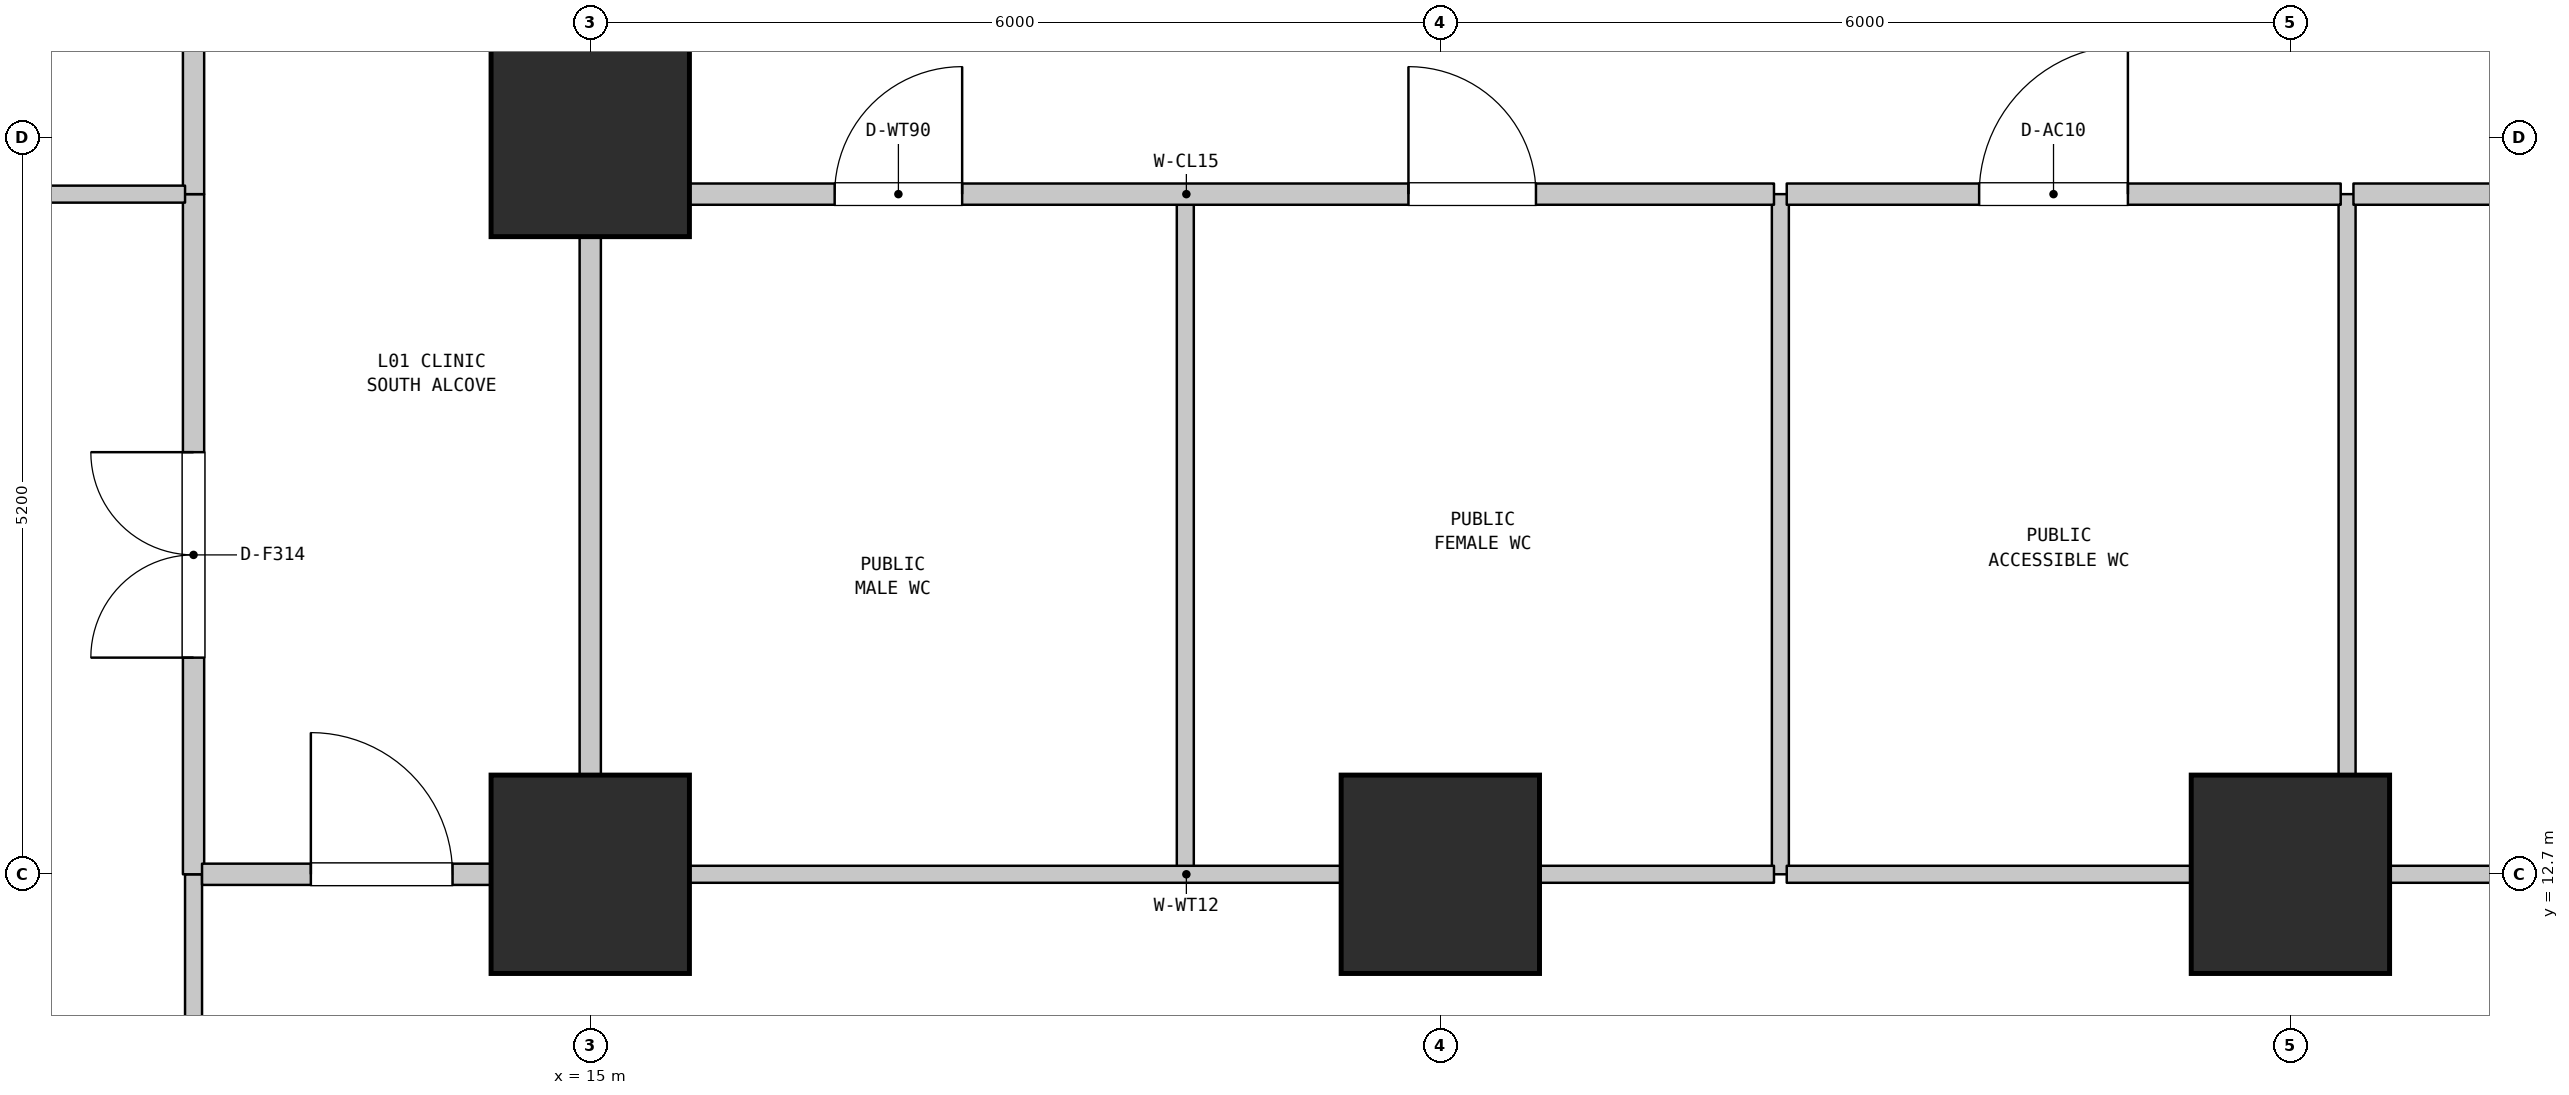
"""IFC4 building model, lengths in metres.
Left out: names, types, materials, properties, quantities, classifications, styles, units other than length and angle.
Written with IfcOpenShell. Run it as: python <this file> out.ifc"""

import sys

from ifc_helpers import new_model, si_unit, direction, frame, frame_2d, origin, origin_2d, place, context, subcontext, project, spatial, rectangle, extrude, element, fill, save


model = new_model("IFC4")
c1 = context("Model", 3, precision=1e-05, world=origin(), true_north=direction((0.0, 1.0)))
c2 = subcontext(c1, "Body", "Model", "MODEL_VIEW")
j1 = project(units=[si_unit("LENGTHUNIT", "METRE"), si_unit("PLANEANGLEUNIT", "RADIAN")], contexts=[c1])
p1 = place(None, origin())
s1 = spatial("IfcSite", under=j1, at=p1, CompositionType="ELEMENT")
p2 = place(p1, origin())
s2 = spatial("IfcBuilding", under=s1, at=p2, CompositionType="ELEMENT")
p3 = place(p2, frame((0.0, 0.0, 6.5)))
s3 = spatial("IfcBuildingStorey", under=s2, at=p3, CompositionType="ELEMENT", Elevation=6.5)
for number, where, z_axis, x_axis in (
    (1, (15.0, 12.7, 0.0), (0.0, 0.0, 1.0), (1.0, 0.0, 0.0)),
    (2, (15.0, 17.9, 0.0), (0.0, 0.0, 1.0), (1.0, 0.0, 0.0)),
    (3, (21.0, 12.7, 0.0), (0.0, 0.0, 1.0), (1.0, 0.0, 0.0)),
    (4, (27.0, 12.7, 0.0), (0.0, 0.0, 1.0), (1.0, 0.0, 0.0)),
):
    element("IfcColumn", number, at=place(p3, frame(where, z_axis=z_axis, x_axis=x_axis)), inside=s3, PredefinedType="COLUMN", context=c2, shape_type="SweptSolid", body=[
        extrude(rectangle(XDim=1.4, YDim=1.4, at=origin_2d()), origin(), (0.0, 0.0, 1.0), 6.5),
    ])
p4 = place(p3, frame((12.2, 0.71, 0.0), z_axis=(0.0, 0.0, 1.0), x_axis=(0.0, 1.0, 0.0)))
e5 = element("IfcWall", 5, at=p4, inside=s3, PredefinedType="PARTITIONING", context=c2, shape_type="SweptSolid", body=[
    extrude(rectangle(XDim=11.99, YDim=0.12, at=frame_2d((5.995, 0.0))), origin(), (0.0, 0.0, 1.0), 6.17),
])
p5 = place(p3, frame((12.2, 12.7, 0.0), z_axis=(0.0, 0.0, 1.0), x_axis=(0.0, 1.0, 0.0)))
e6 = element("IfcWall", 6, at=p5, inside=s3, PredefinedType="STANDARD", context=c2, shape_type="SweptSolid", body=[
    extrude(rectangle(XDim=4.8, YDim=0.15, at=frame_2d((2.4, 0.0))), origin(), (0.0, 0.0, 1.0), 6.17),
])
p6 = place(p5, frame((1.529, 0.0, 0.0)))
e7 = element("IfcOpeningElement", 7, at=p6, cuts=e6, PredefinedType="OPENING", context=c2, shape_type="SweptSolid", body=[
    extrude(rectangle(XDim=1.45, YDim=2.2, at=frame_2d((0.725, 1.1))), frame((0.0, 0.085, 0.0), z_axis=(0.0, -1.0, 0.0), x_axis=(1.0, 0.0, 0.0)), (0.0, 0.0, 1.0), 0.17),
])
p7 = place(p3, frame((12.2, 17.5, 0.0), z_axis=(0.0, 0.0, 1.0), x_axis=(0.0, 1.0, 0.0)))
e8 = element("IfcWall", 8, at=p7, inside=s3, PredefinedType="STANDARD", context=c2, shape_type="SweptSolid", body=[
    extrude(rectangle(XDim=6.7, YDim=0.15, at=frame_2d((3.35, 0.0))), origin(), (0.0, 0.0, 1.0), 6.17),
])
p8 = place(p7, frame((2.829, 0.0, 0.0)))
e9 = element("IfcOpeningElement", 9, at=p8, cuts=e8, PredefinedType="OPENING", context=c2, shape_type="SweptSolid", body=[
    extrude(rectangle(XDim=1.0, YDim=2.15, at=frame_2d((0.5, 1.075))), frame((0.0, 0.085, 0.0), z_axis=(0.0, -1.0, 0.0), x_axis=(1.0, 0.0, 0.0)), (0.0, 0.0, 1.0), 0.17),
])
p9 = place(p3, frame((15.0, 12.7, 0.0), z_axis=(0.0, 0.0, 1.0), x_axis=(0.0, 1.0, 0.0)))
e10 = element("IfcWall", 10, at=p9, inside=s3, PredefinedType="STANDARD", context=c2, shape_type="SweptSolid", body=[
    extrude(rectangle(XDim=4.8, YDim=0.15, at=frame_2d((2.4, 0.0))), origin(), (0.0, 0.0, 1.0), 5.67),
])
for number, where, z_axis, x_axis in (
    (11, (19.2, 12.7, 0.0), (0.0, 0.0, 1.0), (0.0, 1.0, 0.0)),
    (12, (23.4, 12.7, 0.0), (0.0, 0.0, 1.0), (0.0, 1.0, 0.0)),
    (13, (27.4, 12.7, 0.0), (0.0, 0.0, 1.0), (0.0, 1.0, 0.0)),
):
    element("IfcWall", number, at=place(p3, frame(where, z_axis=z_axis, x_axis=x_axis)), inside=s3, PredefinedType="PARTITIONING", context=c2, shape_type="SweptSolid", body=[
        extrude(rectangle(XDim=4.8, YDim=0.12, at=frame_2d((2.4, 0.0))), origin(), (0.0, 0.0, 1.0), 6.17),
    ])
p10 = place(p3, frame((12.26, 12.7, 0.0), z_axis=(0.0, 0.0, 1.0), x_axis=(1.0, 0.0, 0.0)))
e14 = element("IfcWall", 14, at=p10, inside=s3, PredefinedType="STANDARD", context=c2, shape_type="SweptSolid", body=[
    extrude(rectangle(XDim=2.68, YDim=0.15, at=frame_2d((1.34, 0.0))), origin(), (0.0, 0.0, 1.0), 6.17),
])
p11 = place(p10, frame((0.768, 0.0, 0.0)))
e15 = element("IfcOpeningElement", 15, at=p11, cuts=e14, PredefinedType="OPENING", context=c2, shape_type="SweptSolid", body=[
    extrude(rectangle(XDim=1.0, YDim=2.15, at=frame_2d((0.5, 1.075))), frame((0.0, 0.085, 0.0), z_axis=(0.0, -1.0, 0.0), x_axis=(1.0, 0.0, 0.0)), (0.0, 0.0, 1.0), 0.17),
])
p12 = place(p3, frame((15.06, 12.7, 0.0), z_axis=(0.0, 0.0, 1.0), x_axis=(1.0, 0.0, 0.0)))
e16 = element("IfcWall", 16, at=p12, inside=s3, PredefinedType="PARTITIONING", context=c2, shape_type="SweptSolid", body=[
    extrude(rectangle(XDim=8.295, YDim=0.12, at=frame_2d((4.147, 0.0))), origin(), (0.0, 0.0, 1.0), 6.17),
])
p13 = place(p3, frame((23.445, 12.7, 0.0), z_axis=(0.0, 0.0, 1.0), x_axis=(1.0, 0.0, 0.0)))
e17 = element("IfcWall", 17, at=p13, inside=s3, PredefinedType="PARTITIONING", context=c2, shape_type="SweptSolid", body=[
    extrude(rectangle(XDim=3.91, YDim=0.12, at=frame_2d((1.955, 0.0))), origin(), (0.0, 0.0, 1.0), 6.17),
])
p14 = place(p3, frame((27.445, 12.7, 0.0), z_axis=(0.0, 0.0, 1.0), x_axis=(1.0, 0.0, 0.0)))
e18 = element("IfcWall", 18, at=p14, inside=s3, PredefinedType="PARTITIONING", context=c2, shape_type="SweptSolid", body=[
    extrude(rectangle(XDim=5.545, YDim=0.12, at=frame_2d((2.772, 0.0))), origin(), (0.0, 0.0, 1.0), 6.17),
])
p15 = place(p3, frame((3.69, 17.5, 0.0), z_axis=(0.0, 0.0, 1.0), x_axis=(1.0, 0.0, 0.0)))
e19 = element("IfcWall", 19, at=p15, inside=s3, PredefinedType="PARTITIONING", context=c2, shape_type="SweptSolid", body=[
    extrude(rectangle(XDim=8.45, YDim=0.12, at=frame_2d((4.225, 0.0))), origin(), (0.0, 0.0, 1.0), 6.17),
])
p16 = place(p3, frame((15.06, 17.5, 0.0), z_axis=(0.0, 0.0, 1.0), x_axis=(1.0, 0.0, 0.0)))
e20 = element("IfcWall", 20, at=p16, inside=s3, PredefinedType="STANDARD", context=c2, shape_type="SweptSolid", body=[
    extrude(rectangle(XDim=8.295, YDim=0.15, at=frame_2d((4.147, 0.0))), origin(), (0.0, 0.0, 1.0), 6.17),
])
p17 = place(p16, frame((1.665, 0.0, 0.0)))
e21 = element("IfcOpeningElement", 21, at=p17, cuts=e20, PredefinedType="OPENING", context=c2, shape_type="SweptSolid", body=[
    extrude(rectangle(XDim=0.9, YDim=2.1, at=frame_2d((0.45, 1.05))), frame((0.0, 0.085, 0.0), z_axis=(0.0, -1.0, 0.0), x_axis=(1.0, 0.0, 0.0)), (0.0, 0.0, 1.0), 0.17),
])
p18 = place(p16, frame((5.715, 0.0, 0.0)))
e22 = element("IfcOpeningElement", 22, at=p18, cuts=e20, PredefinedType="OPENING", context=c2, shape_type="SweptSolid", body=[
    extrude(rectangle(XDim=0.9, YDim=2.1, at=frame_2d((0.45, 1.05))), frame((0.0, 0.085, 0.0), z_axis=(0.0, -1.0, 0.0), x_axis=(1.0, 0.0, 0.0)), (0.0, 0.0, 1.0), 0.17),
])
p19 = place(p3, frame((23.445, 17.5, 0.0), z_axis=(0.0, 0.0, 1.0), x_axis=(1.0, 0.0, 0.0)))
e23 = element("IfcWall", 23, at=p19, inside=s3, PredefinedType="STANDARD", context=c2, shape_type="SweptSolid", body=[
    extrude(rectangle(XDim=3.91, YDim=0.15, at=frame_2d((1.955, 0.0))), origin(), (0.0, 0.0, 1.0), 6.17),
])
p20 = place(p19, frame((1.358, 0.0, 0.0)))
e24 = element("IfcOpeningElement", 24, at=p20, cuts=e23, PredefinedType="OPENING", context=c2, shape_type="SweptSolid", body=[
    extrude(rectangle(XDim=1.05, YDim=2.15, at=frame_2d((0.525, 1.075))), frame((0.0, 0.085, 0.0), z_axis=(0.0, -1.0, 0.0), x_axis=(1.0, 0.0, 0.0)), (0.0, 0.0, 1.0), 0.17),
])
p21 = place(p3, frame((27.445, 17.5, 0.0), z_axis=(0.0, 0.0, 1.0), x_axis=(1.0, 0.0, 0.0)))
e25 = element("IfcWall", 25, at=p21, inside=s3, PredefinedType="STANDARD", context=c2, shape_type="SweptSolid", body=[
    extrude(rectangle(XDim=5.545, YDim=0.15, at=frame_2d((2.772, 0.0))), origin(), (0.0, 0.0, 1.0), 6.17),
])
p22 = place(p21, frame((2.059, 0.0, 0.0)))
e26 = element("IfcOpeningElement", 26, at=p22, cuts=e25, PredefinedType="OPENING", context=c2, shape_type="SweptSolid", body=[
    extrude(rectangle(XDim=1.0, YDim=2.15, at=frame_2d((0.5, 1.075))), frame((0.0, 0.085, 0.0), z_axis=(0.0, -1.0, 0.0), x_axis=(1.0, 0.0, 0.0)), (0.0, 0.0, 1.0), 0.17),
])
p23 = place(p6, origin())
e27 = element("IfcDoor", 27, at=p23, inside=s3, OperationType="DOUBLE_DOOR_SINGLE_SWING", PredefinedType="DOOR", context=c2, shape_type="SweptSolid", body=[
    extrude(rectangle(XDim=1.45, YDim=2.2, at=frame_2d((0.725, 1.1))), frame((0.0, 0.025, 0.0), z_axis=(0.0, -1.0, 0.0), x_axis=(1.0, 0.0, 0.0)), (0.0, 0.0, 1.0), 0.05),
])
fill(e7, e27)
p24 = place(p11, origin())
e28 = element("IfcDoor", 28, at=p24, inside=s3, OperationType="SINGLE_SWING_LEFT", PredefinedType="DOOR", context=c2, shape_type="SweptSolid", body=[
    extrude(rectangle(XDim=1.0, YDim=2.15, at=frame_2d((0.5, 1.075))), frame((0.0, 0.025, 0.0), z_axis=(0.0, -1.0, 0.0), x_axis=(1.0, 0.0, 0.0)), (0.0, 0.0, 1.0), 0.05),
])
fill(e15, e28)
p25 = place(p17, origin())
e29 = element("IfcDoor", 29, at=p25, inside=s3, OperationType="SINGLE_SWING_RIGHT", PredefinedType="DOOR", context=c2, shape_type="SweptSolid", body=[
    extrude(rectangle(XDim=0.9, YDim=2.1, at=frame_2d((0.45, 1.05))), frame((0.0, 0.025, 0.0), z_axis=(0.0, -1.0, 0.0), x_axis=(1.0, 0.0, 0.0)), (0.0, 0.0, 1.0), 0.05),
])
fill(e21, e29)
p26 = place(p18, origin())
e30 = element("IfcDoor", 30, at=p26, inside=s3, OperationType="SINGLE_SWING_LEFT", PredefinedType="DOOR", context=c2, shape_type="SweptSolid", body=[
    extrude(rectangle(XDim=0.9, YDim=2.1, at=frame_2d((0.45, 1.05))), frame((0.0, 0.025, 0.0), z_axis=(0.0, -1.0, 0.0), x_axis=(1.0, 0.0, 0.0)), (0.0, 0.0, 1.0), 0.05),
])
fill(e22, e30)
p27 = place(p20, origin())
e31 = element("IfcDoor", 31, at=p27, inside=s3, OperationType="SINGLE_SWING_RIGHT", PredefinedType="DOOR", context=c2, shape_type="SweptSolid", body=[
    extrude(rectangle(XDim=1.05, YDim=2.15, at=frame_2d((0.525, 1.075))), frame((0.0, 0.025, 0.0), z_axis=(0.0, -1.0, 0.0), x_axis=(1.0, 0.0, 0.0)), (0.0, 0.0, 1.0), 0.05),
])
fill(e24, e31)
save(model, sys.argv[1])
